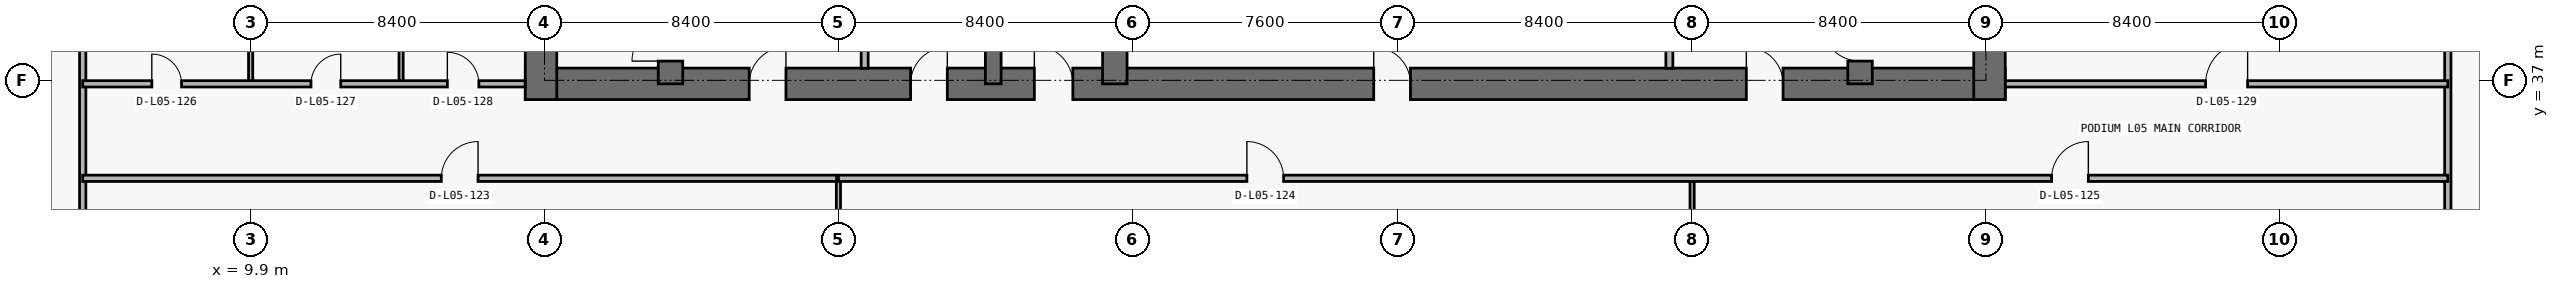
"""IFC4 building model, lengths in metres.
Left out: names, types, materials, properties, quantities, classifications, styles, units other than length and angle.
Written with IfcOpenShell. Run it as: python <this file> out.ifc"""

import sys

from ifc_helpers import new_model, si_unit, direction, frame, frame_2d, origin, place, context, subcontext, project, spatial, rectangle, extrude, element, fill, save


model = new_model("IFC4")
c1 = context("Model", 3, precision=1e-05, world=origin(), true_north=direction((0.0, 1.0)))
c2 = subcontext(c1, "Body", "Model", "MODEL_VIEW")
j1 = project(units=[si_unit("LENGTHUNIT", "METRE"), si_unit("PLANEANGLEUNIT", "RADIAN")], contexts=[c1])
p1 = place(None, origin())
s1 = spatial("IfcSite", under=j1, at=p1, CompositionType="ELEMENT")
p2 = place(p1, origin())
s2 = spatial("IfcBuilding", under=s1, at=p2, CompositionType="ELEMENT")
p3 = place(p2, frame((0.0, 0.0, 24.6)))
s3 = spatial("IfcBuildingStorey", under=s2, at=p3, CompositionType="ELEMENT", Elevation=24.6)
p4 = place(p3, frame((17.75, 36.9, 0.0), z_axis=(0.0, 0.0, 1.0), x_axis=(1.0, 0.0, 0.0)))
e1 = element("IfcWall", 1, at=p4, inside=s3, PredefinedType="SHEAR", context=c2, shape_type="SweptSolid", body=[
    extrude(rectangle(XDim=42.3, YDim=0.9, at=frame_2d((21.15, 0.0))), origin(), (0.0, 0.0, 1.0), 5.15),
])
p5 = place(p4, frame((14.55, 0.0, 0.0)))
e2 = element("IfcOpeningElement", 2, at=p5, cuts=e1, PredefinedType="OPENING", context=c2, shape_type="SweptSolid", body=[
    extrude(rectangle(XDim=1.1, YDim=2.15, at=frame_2d((0.55, 1.075))), frame((0.0, 0.46, 0.0), z_axis=(0.0, -1.0, 0.0), x_axis=(1.0, 0.0, 0.0)), (0.0, 0.0, 1.0), 0.92),
])
p6 = place(p4, frame((6.4, 0.0, 0.0)))
e3 = element("IfcOpeningElement", 3, at=p6, cuts=e1, PredefinedType="OPENING", context=c2, shape_type="SweptSolid", body=[
    extrude(rectangle(XDim=1.05, YDim=2.15, at=frame_2d((0.525, 1.075))), frame((0.0, 0.46, 0.0), z_axis=(0.0, -1.0, 0.0), x_axis=(1.0, 0.0, 0.0)), (0.0, 0.0, 1.0), 0.92),
])
p7 = place(p4, frame((34.9, 0.0, 0.0)))
e4 = element("IfcOpeningElement", 4, at=p7, cuts=e1, PredefinedType="OPENING", context=c2, shape_type="SweptSolid", body=[
    extrude(rectangle(XDim=1.05, YDim=2.15, at=frame_2d((0.525, 1.075))), frame((0.0, 0.46, 0.0), z_axis=(0.0, -1.0, 0.0), x_axis=(1.0, 0.0, 0.0)), (0.0, 0.0, 1.0), 0.92),
])
p8 = place(p4, frame((11.012, 0.0, 0.0)))
e5 = element("IfcOpeningElement", 5, at=p8, cuts=e1, PredefinedType="OPENING", context=c2, shape_type="SweptSolid", body=[
    extrude(rectangle(XDim=1.05, YDim=2.15, at=frame_2d((0.525, 1.075))), frame((0.0, 0.46, 0.0), z_axis=(0.0, -1.0, 0.0), x_axis=(1.0, 0.0, 0.0)), (0.0, 0.0, 1.0), 0.92),
])
p9 = place(p4, frame((24.25, 0.0, 0.0)))
e6 = element("IfcOpeningElement", 6, at=p9, cuts=e1, PredefinedType="OPENING", context=c2, shape_type="SweptSolid", body=[
    extrude(rectangle(XDim=1.05, YDim=2.15, at=frame_2d((0.525, 1.075))), frame((0.0, 0.46, 0.0), z_axis=(0.0, -1.0, 0.0), x_axis=(1.0, 0.0, 0.0)), (0.0, 0.0, 1.0), 0.92),
])
for number, where, z_axis, x_axis in (
    (7, (18.2, 36.45, 0.0), (0.0, 0.0, 1.0), (0.0, 1.0, 0.0)),
    (8, (59.6, 36.45, 0.0), (0.0, 0.0, 1.0), (0.0, 1.0, 0.0)),
):
    element("IfcWall", number, at=place(p3, frame(where, z_axis=z_axis, x_axis=x_axis)), inside=s3, PredefinedType="SHEAR", context=c2, shape_type="SweptSolid", body=[
        extrude(rectangle(XDim=14.15, YDim=0.9, at=frame_2d((7.075, 0.0))), origin(), (0.0, 0.0, 1.0), 5.15),
    ])
p10 = place(p3, frame((21.9, 36.9, 0.0), z_axis=(0.0, 0.0, 1.0), x_axis=(0.0, 1.0, 0.0)))
e9 = element("IfcWall", 9, at=p10, inside=s3, PredefinedType="SHEAR", context=c2, shape_type="SweptSolid", body=[
    extrude(rectangle(XDim=9.675, YDim=0.7, at=frame_2d((4.837, 0.0))), origin(), (0.0, 0.0, 1.0), 5.15),
])
p11 = place(p10, frame((0.65, 0.0, 0.0)))
e10 = element("IfcOpeningElement", 10, at=p11, cuts=e9, PredefinedType="OPENING", context=c2, shape_type="SweptSolid", body=[
    extrude(rectangle(XDim=1.1, YDim=2.15, at=frame_2d((0.55, 1.075))), frame((0.0, 0.36, 0.0), z_axis=(0.0, -1.0, 0.0), x_axis=(1.0, 0.0, 0.0)), (0.0, 0.0, 1.0), 0.72),
])
p12 = place(p3, frame((55.9, 36.9, 0.0), z_axis=(0.0, 0.0, 1.0), x_axis=(0.0, 1.0, 0.0)))
e11 = element("IfcWall", 11, at=p12, inside=s3, PredefinedType="SHEAR", context=c2, shape_type="SweptSolid", body=[
    extrude(rectangle(XDim=9.675, YDim=0.7, at=frame_2d((4.837, 0.0))), origin(), (0.0, 0.0, 1.0), 5.15),
])
p13 = place(p12, frame((0.65, 0.0, 0.0)))
e12 = element("IfcOpeningElement", 12, at=p13, cuts=e11, PredefinedType="OPENING", context=c2, shape_type="SweptSolid", body=[
    extrude(rectangle(XDim=1.1, YDim=2.15, at=frame_2d((0.55, 1.075))), frame((0.0, 0.36, 0.0), z_axis=(0.0, -1.0, 0.0), x_axis=(1.0, 0.0, 0.0)), (0.0, 0.0, 1.0), 0.72),
])
p14 = place(p3, frame((31.125, 36.9, 0.0), z_axis=(0.0, 0.0, 1.0), x_axis=(0.0, 1.0, 0.0)))
e13 = element("IfcWall", 13, at=p14, inside=s3, PredefinedType="SHEAR", context=c2, shape_type="SweptSolid", body=[
    extrude(rectangle(XDim=9.675, YDim=0.45, at=frame_2d((4.837, 0.0))), origin(), (0.0, 0.0, 1.0), 5.15),
])
p15 = place(p3, frame((34.6, 36.9, 0.0), z_axis=(0.0, 0.0, 1.0), x_axis=(0.0, 1.0, 0.0)))
e14 = element("IfcWall", 14, at=p15, inside=s3, PredefinedType="SHEAR", context=c2, shape_type="SweptSolid", body=[
    extrude(rectangle(XDim=9.675, YDim=0.7, at=frame_2d((4.837, 0.0))), origin(), (0.0, 0.0, 1.0), 5.15),
])
p16 = place(p3, frame((5.1, 6.285, 0.0), z_axis=(0.0, 0.0, 1.0), x_axis=(0.0, 1.0, 0.0)))
e15 = element("IfcWall", 15, at=p16, inside=s3, PredefinedType="PARTITIONING", context=c2, shape_type="SweptSolid", body=[
    extrude(rectangle(XDim=40.995, YDim=0.18, at=frame_2d((20.498, 0.0))), origin(), (0.0, 0.0, 1.0), 5.15),
])
p17 = place(p3, frame((9.9, 36.9, 0.0), z_axis=(0.0, 0.0, 1.0), x_axis=(0.0, 1.0, 0.0)))
e16 = element("IfcWall", 16, at=p17, inside=s3, PredefinedType="PARTITIONING", context=c2, shape_type="SweptSolid", body=[
    extrude(rectangle(XDim=6.9, YDim=0.12, at=frame_2d((3.45, 0.0))), origin(), (0.0, 0.0, 1.0), 3.635),
])
p18 = place(p3, frame((14.2, 36.9, 0.0), z_axis=(0.0, 0.0, 1.0), x_axis=(0.0, 1.0, 0.0)))
e17 = element("IfcWall", 17, at=p18, inside=s3, PredefinedType="PARTITIONING", context=c2, shape_type="SweptSolid", body=[
    extrude(rectangle(XDim=6.9, YDim=0.12, at=frame_2d((3.45, 0.0))), origin(), (0.0, 0.0, 1.0), 5.15),
])
p19 = place(p3, frame((26.7, 3.295, 0.0), z_axis=(0.0, 0.0, 1.0), x_axis=(0.0, 1.0, 0.0)))
e18 = element("IfcWall", 18, at=p19, inside=s3, PredefinedType="PARTITIONING", context=c2, shape_type="SweptSolid", body=[
    extrude(rectangle(XDim=30.905, YDim=0.12, at=frame_2d((15.453, 0.0))), origin(), (0.0, 0.0, 1.0), 3.335),
])
for number, where, z_axis, x_axis in (
    (19, (27.45, 37.345, 0.0), (0.0, 0.0, 1.0), (0.0, 1.0, 0.0)),
    (20, (50.45, 37.345, 0.0), (0.0, 0.0, 1.0), (0.0, 1.0, 0.0)),
):
    element("IfcWall", number, at=place(p3, frame(where, z_axis=z_axis, x_axis=x_axis)), inside=s3, PredefinedType="PARTITIONING", context=c2, shape_type="SweptSolid", body=[
        extrude(rectangle(XDim=5.385, YDim=0.2, at=frame_2d((2.692, 0.0))), origin(), (0.0, 0.0, 1.0), 5.15),
    ])
p20 = place(p3, frame((51.1, 3.295, 0.0), z_axis=(0.0, 0.0, 1.0), x_axis=(0.0, 1.0, 0.0)))
e21 = element("IfcWall", 21, at=p20, inside=s3, PredefinedType="PARTITIONING", context=c2, shape_type="SweptSolid", body=[
    extrude(rectangle(XDim=30.905, YDim=0.12, at=frame_2d((15.453, 0.0))), origin(), (0.0, 0.0, 1.0), 3.335),
])
p21 = place(p3, frame((72.7, 6.32, 0.0), z_axis=(0.0, 0.0, 1.0), x_axis=(0.0, 1.0, 0.0)))
e22 = element("IfcWall", 22, at=p21, inside=s3, PredefinedType="PARTITIONING", context=c2, shape_type="SweptSolid", body=[
    extrude(rectangle(XDim=40.96, YDim=0.18, at=frame_2d((20.48, 0.0))), origin(), (0.0, 0.0, 1.0), 5.15),
])
p22 = place(p3, frame((5.1, 34.2, 0.0), z_axis=(0.0, 0.0, 1.0), x_axis=(1.0, 0.0, 0.0)))
e23 = element("IfcWall", 23, at=p22, inside=s3, PredefinedType="PARTITIONING", context=c2, shape_type="SweptSolid", body=[
    extrude(rectangle(XDim=21.55, YDim=0.18, at=frame_2d((10.775, 0.0))), origin(), (0.0, 0.0, 1.0), 5.15),
])
p23 = place(p22, frame((10.25, 0.0, 0.0)))
e24 = element("IfcOpeningElement", 24, at=p23, cuts=e23, PredefinedType="OPENING", context=c2, shape_type="SweptSolid", body=[
    extrude(rectangle(XDim=1.05, YDim=2.15, at=frame_2d((0.525, 1.075))), frame((0.0, 0.1, 0.0), z_axis=(0.0, -1.0, 0.0), x_axis=(1.0, 0.0, 0.0)), (0.0, 0.0, 1.0), 0.2),
])
p24 = place(p3, frame((26.7, 34.2, 0.0), z_axis=(0.0, 0.0, 1.0), x_axis=(1.0, 0.0, 0.0)))
e25 = element("IfcWall", 25, at=p24, inside=s3, PredefinedType="PARTITIONING", context=c2, shape_type="SweptSolid", body=[
    extrude(rectangle(XDim=46.0, YDim=0.18, at=frame_2d((23.0, 0.0))), origin(), (0.0, 0.0, 1.0), 5.15),
])
p25 = place(p24, frame((11.675, 0.0, 0.0)))
e26 = element("IfcOpeningElement", 26, at=p25, cuts=e25, PredefinedType="OPENING", context=c2, shape_type="SweptSolid", body=[
    extrude(rectangle(XDim=1.05, YDim=2.15, at=frame_2d((0.525, 1.075))), frame((0.0, 0.1, 0.0), z_axis=(0.0, -1.0, 0.0), x_axis=(1.0, 0.0, 0.0)), (0.0, 0.0, 1.0), 0.2),
])
p26 = place(p24, frame((34.675, 0.0, 0.0)))
e27 = element("IfcOpeningElement", 27, at=p26, cuts=e25, PredefinedType="OPENING", context=c2, shape_type="SweptSolid", body=[
    extrude(rectangle(XDim=1.05, YDim=2.15, at=frame_2d((0.525, 1.075))), frame((0.0, 0.1, 0.0), z_axis=(0.0, -1.0, 0.0), x_axis=(1.0, 0.0, 0.0)), (0.0, 0.0, 1.0), 0.2),
])
p27 = place(p3, frame((5.1, 36.9, 0.0), z_axis=(0.0, 0.0, 1.0), x_axis=(1.0, 0.0, 0.0)))
e28 = element("IfcWall", 28, at=p27, inside=s3, PredefinedType="PARTITIONING", context=c2, shape_type="SweptSolid", body=[
    extrude(rectangle(XDim=12.645, YDim=0.18, at=frame_2d((6.323, 0.0))), origin(), (0.0, 0.0, 1.0), 5.15),
])
p28 = place(p27, frame((1.975, 0.0, 0.0)))
e29 = element("IfcOpeningElement", 29, at=p28, cuts=e28, PredefinedType="OPENING", context=c2, shape_type="SweptSolid", body=[
    extrude(rectangle(XDim=0.85, YDim=2.1, at=frame_2d((0.425, 1.05))), frame((0.0, 0.1, 0.0), z_axis=(0.0, -1.0, 0.0), x_axis=(1.0, 0.0, 0.0)), (0.0, 0.0, 1.0), 0.2),
])
p29 = place(p27, frame((6.525, 0.0, 0.0)))
e30 = element("IfcOpeningElement", 30, at=p29, cuts=e28, PredefinedType="OPENING", context=c2, shape_type="SweptSolid", body=[
    extrude(rectangle(XDim=0.85, YDim=2.1, at=frame_2d((0.425, 1.05))), frame((0.0, 0.1, 0.0), z_axis=(0.0, -1.0, 0.0), x_axis=(1.0, 0.0, 0.0)), (0.0, 0.0, 1.0), 0.2),
])
p30 = place(p27, frame((10.423, 0.0, 0.0)))
e31 = element("IfcOpeningElement", 31, at=p30, cuts=e28, PredefinedType="OPENING", context=c2, shape_type="SweptSolid", body=[
    extrude(rectangle(XDim=0.9, YDim=2.15, at=frame_2d((0.45, 1.075))), frame((0.0, 0.1, 0.0), z_axis=(0.0, -1.0, 0.0), x_axis=(1.0, 0.0, 0.0)), (0.0, 0.0, 1.0), 0.2),
])
p31 = place(p3, frame((60.055, 36.9, 0.0), z_axis=(0.0, 0.0, 1.0), x_axis=(1.0, 0.0, 0.0)))
e32 = element("IfcWall", 32, at=p31, inside=s3, PredefinedType="PARTITIONING", context=c2, shape_type="SweptSolid", body=[
    extrude(rectangle(XDim=12.645, YDim=0.18, at=frame_2d((6.323, 0.0))), origin(), (0.0, 0.0, 1.0), 5.15),
])
p32 = place(p31, frame((5.722, 0.0, 0.0)))
e33 = element("IfcOpeningElement", 33, at=p32, cuts=e32, PredefinedType="OPENING", context=c2, shape_type="SweptSolid", body=[
    extrude(rectangle(XDim=1.2, YDim=2.2, at=frame_2d((0.6, 1.1))), frame((0.0, 0.1, 0.0), z_axis=(0.0, -1.0, 0.0), x_axis=(1.0, 0.0, 0.0)), (0.0, 0.0, 1.0), 0.2),
])
p33 = place(p5, origin())
e34 = element("IfcDoor", 34, at=p33, inside=s3, OperationType="SINGLE_SWING_LEFT", PredefinedType="DOOR", context=c2, shape_type="SweptSolid", body=[
    extrude(rectangle(XDim=1.1, YDim=2.15, at=frame_2d((0.55, 1.075))), frame((0.0, 0.025, 0.0), z_axis=(0.0, -1.0, 0.0), x_axis=(1.0, 0.0, 0.0)), (0.0, 0.0, 1.0), 0.05),
])
fill(e2, e34)
p34 = place(p6, origin())
e35 = element("IfcDoor", 35, at=p34, inside=s3, OperationType="SINGLE_SWING_RIGHT", PredefinedType="DOOR", context=c2, shape_type="SweptSolid", body=[
    extrude(rectangle(XDim=1.05, YDim=2.15, at=frame_2d((0.525, 1.075))), frame((0.0, 0.025, 0.0), z_axis=(0.0, -1.0, 0.0), x_axis=(1.0, 0.0, 0.0)), (0.0, 0.0, 1.0), 0.05),
])
fill(e3, e35)
p35 = place(p11, origin())
e36 = element("IfcDoor", 36, at=p35, inside=s3, OperationType="SINGLE_SWING_LEFT", PredefinedType="DOOR", context=c2, shape_type="SweptSolid", body=[
    extrude(rectangle(XDim=1.1, YDim=2.15, at=frame_2d((0.55, 1.075))), frame((0.0, 0.025, 0.0), z_axis=(0.0, -1.0, 0.0), x_axis=(1.0, 0.0, 0.0)), (0.0, 0.0, 1.0), 0.05),
])
fill(e10, e36)
p36 = place(p7, origin())
e37 = element("IfcDoor", 37, at=p36, inside=s3, OperationType="SINGLE_SWING_LEFT", PredefinedType="DOOR", context=c2, shape_type="SweptSolid", body=[
    extrude(rectangle(XDim=1.05, YDim=2.15, at=frame_2d((0.525, 1.075))), frame((0.0, 0.025, 0.0), z_axis=(0.0, -1.0, 0.0), x_axis=(1.0, 0.0, 0.0)), (0.0, 0.0, 1.0), 0.05),
])
fill(e4, e37)
p37 = place(p13, origin())
e38 = element("IfcDoor", 38, at=p37, inside=s3, OperationType="SINGLE_SWING_RIGHT", PredefinedType="DOOR", context=c2, shape_type="SweptSolid", body=[
    extrude(rectangle(XDim=1.1, YDim=2.15, at=frame_2d((0.55, 1.075))), frame((0.0, 0.025, 0.0), z_axis=(0.0, -1.0, 0.0), x_axis=(1.0, 0.0, 0.0)), (0.0, 0.0, 1.0), 0.05),
])
fill(e12, e38)
p38 = place(p8, origin())
e39 = element("IfcDoor", 39, at=p38, inside=s3, OperationType="SINGLE_SWING_RIGHT", PredefinedType="DOOR", context=c2, shape_type="SweptSolid", body=[
    extrude(rectangle(XDim=1.05, YDim=2.15, at=frame_2d((0.525, 1.075))), frame((0.0, 0.025, 0.0), z_axis=(0.0, -1.0, 0.0), x_axis=(1.0, 0.0, 0.0)), (0.0, 0.0, 1.0), 0.05),
])
fill(e5, e39)
p39 = place(p9, origin())
e40 = element("IfcDoor", 40, at=p39, inside=s3, OperationType="SINGLE_SWING_LEFT", PredefinedType="DOOR", context=c2, shape_type="SweptSolid", body=[
    extrude(rectangle(XDim=1.05, YDim=2.15, at=frame_2d((0.525, 1.075))), frame((0.0, 0.025, 0.0), z_axis=(0.0, -1.0, 0.0), x_axis=(1.0, 0.0, 0.0)), (0.0, 0.0, 1.0), 0.05),
])
fill(e6, e40)
p40 = place(p23, origin())
e41 = element("IfcDoor", 41, at=p40, inside=s3, OperationType="SINGLE_SWING_RIGHT", PredefinedType="DOOR", context=c2, shape_type="SweptSolid", body=[
    extrude(rectangle(XDim=1.05, YDim=2.15, at=frame_2d((0.525, 1.075))), frame((0.0, 0.025, 0.0), z_axis=(0.0, -1.0, 0.0), x_axis=(1.0, 0.0, 0.0)), (0.0, 0.0, 1.0), 0.05),
])
fill(e24, e41)
p41 = place(p25, origin())
e42 = element("IfcDoor", 42, at=p41, inside=s3, OperationType="SINGLE_SWING_LEFT", PredefinedType="DOOR", context=c2, shape_type="SweptSolid", body=[
    extrude(rectangle(XDim=1.05, YDim=2.15, at=frame_2d((0.525, 1.075))), frame((0.0, 0.025, 0.0), z_axis=(0.0, -1.0, 0.0), x_axis=(1.0, 0.0, 0.0)), (0.0, 0.0, 1.0), 0.05),
])
fill(e26, e42)
p42 = place(p26, origin())
e43 = element("IfcDoor", 43, at=p42, inside=s3, OperationType="SINGLE_SWING_RIGHT", PredefinedType="DOOR", context=c2, shape_type="SweptSolid", body=[
    extrude(rectangle(XDim=1.05, YDim=2.15, at=frame_2d((0.525, 1.075))), frame((0.0, 0.025, 0.0), z_axis=(0.0, -1.0, 0.0), x_axis=(1.0, 0.0, 0.0)), (0.0, 0.0, 1.0), 0.05),
])
fill(e27, e43)
p43 = place(p28, origin())
e44 = element("IfcDoor", 44, at=p43, inside=s3, OperationType="SINGLE_SWING_LEFT", PredefinedType="DOOR", context=c2, shape_type="SweptSolid", body=[
    extrude(rectangle(XDim=0.85, YDim=2.1, at=frame_2d((0.425, 1.05))), frame((0.0, 0.025, 0.0), z_axis=(0.0, -1.0, 0.0), x_axis=(1.0, 0.0, 0.0)), (0.0, 0.0, 1.0), 0.05),
])
fill(e29, e44)
p44 = place(p29, origin())
e45 = element("IfcDoor", 45, at=p44, inside=s3, OperationType="SINGLE_SWING_RIGHT", PredefinedType="DOOR", context=c2, shape_type="SweptSolid", body=[
    extrude(rectangle(XDim=0.85, YDim=2.1, at=frame_2d((0.425, 1.05))), frame((0.0, 0.025, 0.0), z_axis=(0.0, -1.0, 0.0), x_axis=(1.0, 0.0, 0.0)), (0.0, 0.0, 1.0), 0.05),
])
fill(e30, e45)
p45 = place(p30, origin())
e46 = element("IfcDoor", 46, at=p45, inside=s3, OperationType="SINGLE_SWING_LEFT", PredefinedType="DOOR", context=c2, shape_type="SweptSolid", body=[
    extrude(rectangle(XDim=0.9, YDim=2.15, at=frame_2d((0.45, 1.075))), frame((0.0, 0.025, 0.0), z_axis=(0.0, -1.0, 0.0), x_axis=(1.0, 0.0, 0.0)), (0.0, 0.0, 1.0), 0.05),
])
fill(e31, e46)
p46 = place(p32, origin())
e47 = element("IfcDoor", 47, at=p46, inside=s3, OperationType="SINGLE_SWING_RIGHT", PredefinedType="DOOR", context=c2, shape_type="SweptSolid", body=[
    extrude(rectangle(XDim=1.2, YDim=2.2, at=frame_2d((0.6, 1.1))), frame((0.0, 0.025, 0.0), z_axis=(0.0, -1.0, 0.0), x_axis=(1.0, 0.0, 0.0)), (0.0, 0.0, 1.0), 0.05),
])
fill(e33, e47)
save(model, sys.argv[1])
